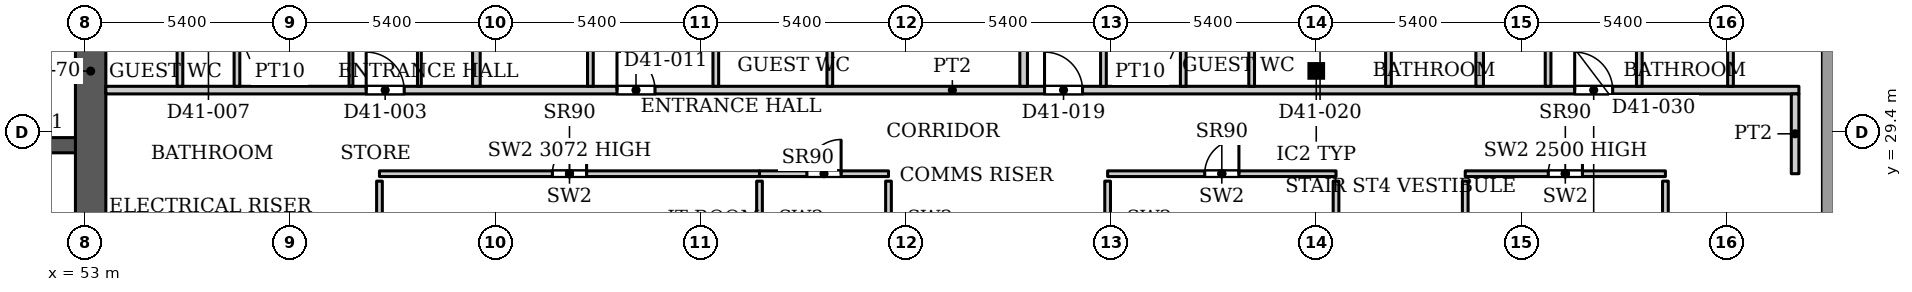
"""IFC4 building model, lengths in metres.
Left out: names, types, materials, properties, quantities, classifications, styles, units other than length and angle.
Written with IfcOpenShell. Run it as: python <this file> out.ifc"""

import sys

from ifc_helpers import new_model, si_unit, direction, frame, frame_2d, origin, origin_2d, place, context, subcontext, project, spatial, rectangle, hollow_rectangle, extrude, source, transform, mapped, element, fill, save


model = new_model("IFC4")
c1 = context("Model", 3, precision=1e-05, world=origin(), true_north=direction((0.0, 1.0)))
c2 = subcontext(c1, "Body", "Model", "MODEL_VIEW")
j1 = project(units=[si_unit("LENGTHUNIT", "METRE"), si_unit("PLANEANGLEUNIT", "RADIAN")], contexts=[c1])
p1 = place(None, origin())
s1 = spatial("IfcSite", under=j1, at=p1, CompositionType="ELEMENT")
p2 = place(p1, origin())
s2 = spatial("IfcBuilding", under=s1, at=p2, CompositionType="ELEMENT")
p3 = place(p2, frame((0.0, 0.0, 179.9)))
s3 = spatial("IfcBuildingStorey", under=s2, at=p3, CompositionType="ELEMENT", Elevation=179.9)
p4 = place(p3, frame((85.4, 31.005, 0.0), z_axis=(0.0, 0.0, 1.0), x_axis=(1.0, 0.0, 0.0)))
e1 = element("IfcColumn", 1, at=p4, inside=s3, PredefinedType="COLUMN", context=c2, shape_type="SweptSolid", body=[
    extrude(hollow_rectangle(XDim=0.305, YDim=0.305, WallThickness=0.016, InnerFilletRadius=0.016, OuterFilletRadius=0.032, at=origin_2d()), origin(), (0.0, 0.0, 1.0), 3.9),
])
p5 = place(p3, frame((34.75, 29.05, 0.0), z_axis=(0.0, 0.0, 1.0), x_axis=(1.0, 0.0, 0.0)))
e2 = element("IfcWall", 2, at=p5, inside=s3, PredefinedType="SHEAR", context=c2, shape_type="SweptSolid", body=[
    extrude(rectangle(XDim=18.4, YDim=0.4, at=frame_2d((9.2, 0.0))), origin(), (0.0, 0.0, 1.0), 3.9),
])
p6 = place(p5, frame((0.875, 0.0, 0.0)))
e3 = element("IfcOpeningElement", 3, at=p6, cuts=e2, PredefinedType="OPENING", context=c2, shape_type="SweptSolid", body=[
    extrude(rectangle(XDim=1.1, YDim=2.2, at=frame_2d((0.55, 1.1))), frame((0.0, 0.21, 0.0), z_axis=(0.0, -1.0, 0.0), x_axis=(1.0, 0.0, 0.0)), (0.0, 0.0, 1.0), 0.42),
])
p7 = place(p5, frame((3.725, 0.0, 0.0)))
e4 = element("IfcOpeningElement", 4, at=p7, cuts=e2, PredefinedType="OPENING", context=c2, shape_type="SweptSolid", body=[
    extrude(rectangle(XDim=1.1, YDim=2.2, at=frame_2d((0.55, 1.1))), frame((0.0, 0.21, 0.0), z_axis=(0.0, -1.0, 0.0), x_axis=(1.0, 0.0, 0.0)), (0.0, 0.0, 1.0), 0.42),
])
p8 = place(p5, frame((6.575, 0.0, 0.0)))
e5 = element("IfcOpeningElement", 5, at=p8, cuts=e2, PredefinedType="OPENING", context=c2, shape_type="SweptSolid", body=[
    extrude(rectangle(XDim=1.1, YDim=2.2, at=frame_2d((0.55, 1.1))), frame((0.0, 0.21, 0.0), z_axis=(0.0, -1.0, 0.0), x_axis=(1.0, 0.0, 0.0)), (0.0, 0.0, 1.0), 0.42),
])
p9 = place(p5, frame((9.425, 0.0, 0.0)))
e6 = element("IfcOpeningElement", 6, at=p9, cuts=e2, PredefinedType="OPENING", context=c2, shape_type="SweptSolid", body=[
    extrude(rectangle(XDim=1.1, YDim=2.2, at=frame_2d((0.55, 1.1))), frame((0.0, 0.21, 0.0), z_axis=(0.0, -1.0, 0.0), x_axis=(1.0, 0.0, 0.0)), (0.0, 0.0, 1.0), 0.42),
])
p10 = place(p5, frame((12.275, 0.0, 0.0)))
e7 = element("IfcOpeningElement", 7, at=p10, cuts=e2, PredefinedType="OPENING", context=c2, shape_type="SweptSolid", body=[
    extrude(rectangle(XDim=1.1, YDim=2.2, at=frame_2d((0.55, 1.1))), frame((0.0, 0.21, 0.0), z_axis=(0.0, -1.0, 0.0), x_axis=(1.0, 0.0, 0.0)), (0.0, 0.0, 1.0), 0.42),
])
p11 = place(p5, frame((15.125, 0.0, 0.0)))
e8 = element("IfcOpeningElement", 8, at=p11, cuts=e2, PredefinedType="OPENING", context=c2, shape_type="SweptSolid", body=[
    extrude(rectangle(XDim=1.1, YDim=2.2, at=frame_2d((0.55, 1.1))), frame((0.0, 0.21, 0.0), z_axis=(0.0, -1.0, 0.0), x_axis=(1.0, 0.0, 0.0)), (0.0, 0.0, 1.0), 0.42),
])
p12 = place(p3, frame((53.15, 25.8, 0.0), z_axis=(0.0, 0.0, 1.0), x_axis=(0.0, 1.0, 0.0)))
e9 = element("IfcWall", 9, at=p12, inside=s3, PredefinedType="SHEAR", context=c2, shape_type="SweptSolid", body=[
    extrude(rectangle(XDim=10.4, YDim=0.8, at=frame_2d((5.2, 0.0))), origin(), (0.0, 0.0, 1.0), 3.9),
])
p13 = place(p3, frame((60.75, 28.3, 0.0), z_axis=(0.0, 0.0, 1.0), x_axis=(1.0, 0.0, 0.0)))
e10 = element("IfcWall", 10, at=p13, inside=s3, PredefinedType="PARTITIONING", context=c2, shape_type="SweptSolid", body=[
    extrude(rectangle(XDim=10.0, YDim=0.15, at=frame_2d((5.0, 0.0))), origin(), (0.0, 0.0, 1.0), 3.072),
])
p14 = place(p13, frame((4.55, 0.0, 0.0)))
e11 = element("IfcOpeningElement", 11, at=p14, cuts=e10, PredefinedType="OPENING", context=c2, shape_type="SweptSolid", body=[
    extrude(rectangle(XDim=0.9, YDim=2.2, at=frame_2d((0.45, 1.1))), frame((0.0, 0.085, 0.0), z_axis=(0.0, -1.0, 0.0), x_axis=(1.0, 0.0, 0.0)), (0.0, 0.0, 1.0), 0.17),
])
p15 = place(p3, frame((60.75, 23.075, 0.0), z_axis=(0.0, 0.0, 1.0), x_axis=(0.0, 1.0, 0.0)))
e12 = element("IfcWall", 12, at=p15, inside=s3, PredefinedType="PARTITIONING", context=c2, shape_type="SweptSolid", body=[
    extrude(rectangle(XDim=5.03, YDim=0.15, at=frame_2d((2.515, 0.0))), origin(), (0.0, 0.0, 1.0), 3.9),
])
p16 = place(p3, frame((70.75, 26.12, 0.0), z_axis=(0.0, 0.0, 1.0), x_axis=(0.0, 1.0, 0.0)))
e13 = element("IfcWall", 13, at=p16, inside=s3, PredefinedType="PARTITIONING", context=c2, shape_type="SweptSolid", body=[
    extrude(rectangle(XDim=1.985, YDim=0.15, at=frame_2d((0.992, 0.0))), origin(), (0.0, 0.0, 1.0), 3.9),
])
p17 = place(p3, frame((70.75, 28.3, 0.0), z_axis=(0.0, 0.0, 1.0), x_axis=(1.0, 0.0, 0.0)))
e14 = element("IfcWall", 14, at=p17, inside=s3, PredefinedType="PARTITIONING", context=c2, shape_type="SweptSolid", body=[
    extrude(rectangle(XDim=3.394, YDim=0.15, at=frame_2d((1.697, 0.0))), origin(), (0.0, 0.0, 1.0), 3.9),
])
p18 = place(p17, frame((1.247, 0.0, 0.0)))
e15 = element("IfcOpeningElement", 15, at=p18, cuts=e14, PredefinedType="OPENING", context=c2, shape_type="SweptSolid", body=[
    extrude(rectangle(XDim=0.9, YDim=2.2, at=frame_2d((0.45, 1.1))), frame((0.0, 0.085, 0.0), z_axis=(0.0, -1.0, 0.0), x_axis=(1.0, 0.0, 0.0)), (0.0, 0.0, 1.0), 0.17),
])
p19 = place(p3, frame((74.144, 26.12, 0.0), z_axis=(0.0, 0.0, 1.0), x_axis=(0.0, 1.0, 0.0)))
e16 = element("IfcWall", 16, at=p19, inside=s3, PredefinedType="PARTITIONING", context=c2, shape_type="SweptSolid", body=[
    extrude(rectangle(XDim=1.985, YDim=0.15, at=frame_2d((0.992, 0.0))), origin(), (0.0, 0.0, 1.0), 3.9),
])
p20 = place(p3, frame((79.91, 28.3, 0.0), z_axis=(0.0, 0.0, 1.0), x_axis=(1.0, 0.0, 0.0)))
e17 = element("IfcWall", 17, at=p20, inside=s3, PredefinedType="PARTITIONING", context=c2, shape_type="SweptSolid", body=[
    extrude(rectangle(XDim=6.01, YDim=0.15, at=frame_2d((3.005, 0.0))), origin(), (0.0, 0.0, 1.0), 3.9),
])
p21 = place(p20, frame((2.555, 0.0, 0.0)))
e18 = element("IfcOpeningElement", 18, at=p21, cuts=e17, PredefinedType="OPENING", context=c2, shape_type="SweptSolid", body=[
    extrude(rectangle(XDim=0.9, YDim=2.2, at=frame_2d((0.45, 1.1))), frame((0.0, 0.085, 0.0), z_axis=(0.0, -1.0, 0.0), x_axis=(1.0, 0.0, 0.0)), (0.0, 0.0, 1.0), 0.17),
])
p22 = place(p3, frame((79.91, 26.12, 0.0), z_axis=(0.0, 0.0, 1.0), x_axis=(0.0, 1.0, 0.0)))
e19 = element("IfcWall", 19, at=p22, inside=s3, PredefinedType="PARTITIONING", context=c2, shape_type="SweptSolid", body=[
    extrude(rectangle(XDim=1.985, YDim=0.15, at=frame_2d((0.992, 0.0))), origin(), (0.0, 0.0, 1.0), 3.9),
])
p23 = place(p3, frame((85.92, 25.62, 0.0), z_axis=(0.0, 0.0, 1.0), x_axis=(0.0, 1.0, 0.0)))
e20 = element("IfcWall", 20, at=p23, inside=s3, PredefinedType="PARTITIONING", context=c2, shape_type="SweptSolid", body=[
    extrude(rectangle(XDim=2.485, YDim=0.15, at=frame_2d((1.242, 0.0))), origin(), (0.0, 0.0, 1.0), 3.9),
])
p24 = place(p3, frame((89.32, 28.3, 0.0), z_axis=(0.0, 0.0, 1.0), x_axis=(1.0, 0.0, 0.0)))
e21 = element("IfcWall", 21, at=p24, inside=s3, PredefinedType="PARTITIONING", context=c2, shape_type="SweptSolid", body=[
    extrude(rectangle(XDim=5.267, YDim=0.15, at=frame_2d((2.633, 0.0))), origin(), (0.0, 0.0, 1.0), 2.5),
])
p25 = place(p24, frame((2.184, 0.0, 0.0)))
e22 = element("IfcOpeningElement", 22, at=p25, cuts=e21, PredefinedType="OPENING", context=c2, shape_type="SweptSolid", body=[
    extrude(rectangle(XDim=0.9, YDim=2.2, at=frame_2d((0.45, 1.1))), frame((0.0, 0.085, 0.0), z_axis=(0.0, -1.0, 0.0), x_axis=(1.0, 0.0, 0.0)), (0.0, 0.0, 1.0), 0.17),
])
p26 = place(p3, frame((89.32, 25.62, 0.0), z_axis=(0.0, 0.0, 1.0), x_axis=(0.0, 1.0, 0.0)))
e23 = element("IfcWall", 23, at=p26, inside=s3, PredefinedType="PARTITIONING", context=c2, shape_type="SweptSolid", body=[
    extrude(rectangle(XDim=2.485, YDim=0.15, at=frame_2d((1.242, 0.0))), origin(), (0.0, 0.0, 1.0), 3.9),
])
p27 = place(p3, frame((94.587, 21.293, 0.0), z_axis=(0.0, 0.0, 1.0), x_axis=(0.0, 1.0, 0.0)))
e24 = element("IfcWall", 24, at=p27, inside=s3, PredefinedType="PARTITIONING", context=c2, shape_type="SweptSolid", body=[
    extrude(rectangle(XDim=6.812, YDim=0.15, at=frame_2d((3.406, 0.0))), origin(), (0.0, 0.0, 1.0), 3.9),
])
p28 = place(p3, frame((53.549, 30.5, 0.0), z_axis=(0.0, 0.0, 1.0), x_axis=(1.0, 0.0, 0.0)))
e25 = element("IfcWall", 25, at=p28, inside=s3, PredefinedType="PARTITIONING", context=c2, shape_type="SweptSolid", body=[
    extrude(rectangle(XDim=44.551, YDim=0.2, at=frame_2d((22.275, 0.0))), origin(), (0.0, 0.0, 1.0), 3.6),
])
p29 = place(p28, frame((6.851, 0.0, 0.0)))
e26 = element("IfcOpeningElement", 26, at=p29, cuts=e25, PredefinedType="OPENING", context=c2, shape_type="SweptSolid", body=[
    extrude(rectangle(XDim=1.0, YDim=2.1, at=frame_2d((0.5, 1.05))), frame((0.0, 0.11, 0.0), z_axis=(0.0, -1.0, 0.0), x_axis=(1.0, 0.0, 0.0)), (0.0, 0.0, 1.0), 0.22),
])
p30 = place(p28, frame((13.451, 0.0, 0.0)))
e27 = element("IfcOpeningElement", 27, at=p30, cuts=e25, PredefinedType="OPENING", context=c2, shape_type="SweptSolid", body=[
    extrude(rectangle(XDim=1.0, YDim=2.1, at=frame_2d((0.5, 1.05))), frame((0.0, 0.11, 0.0), z_axis=(0.0, -1.0, 0.0), x_axis=(1.0, 0.0, 0.0)), (0.0, 0.0, 1.0), 0.22),
])
p31 = place(p28, frame((24.701, 0.0, 0.0)))
e28 = element("IfcOpeningElement", 28, at=p31, cuts=e25, PredefinedType="OPENING", context=c2, shape_type="SweptSolid", body=[
    extrude(rectangle(XDim=1.0, YDim=2.1, at=frame_2d((0.5, 1.05))), frame((0.0, 0.11, 0.0), z_axis=(0.0, -1.0, 0.0), x_axis=(1.0, 0.0, 0.0)), (0.0, 0.0, 1.0), 0.22),
])
p32 = place(p28, frame((38.651, 0.0, 0.0)))
e29 = element("IfcOpeningElement", 29, at=p32, cuts=e25, PredefinedType="OPENING", context=c2, shape_type="SweptSolid", body=[
    extrude(rectangle(XDim=1.0, YDim=2.1, at=frame_2d((0.5, 1.05))), frame((0.0, 0.11, 0.0), z_axis=(0.0, -1.0, 0.0), x_axis=(1.0, 0.0, 0.0)), (0.0, 0.0, 1.0), 0.22),
])
for number, where, z_axis, x_axis in (
    (30, (55.5, 30.6, 0.0), (0.0, 0.0, 1.0), (0.0, 1.0, 0.0)),
    (31, (57.0, 30.6, 0.0), (0.0, 0.0, 1.0), (0.0, 1.0, 0.0)),
):
    element("IfcWall", number, at=place(p3, frame(where, z_axis=z_axis, x_axis=x_axis)), inside=s3, PredefinedType="PARTITIONING", context=c2, shape_type="SweptSolid", body=[
        extrude(rectangle(XDim=3.025, YDim=0.15, at=frame_2d((1.512, 0.0))), origin(), (0.0, 0.0, 1.0), 3.6),
    ])
for number, where, z_axis, x_axis in (
    (32, (60.0, 30.6, 0.0), (0.0, 0.0, 1.0), (0.0, 1.0, 0.0)),
    (33, (61.8, 30.6, 0.0), (0.0, 0.0, 1.0), (0.0, 1.0, 0.0)),
):
    element("IfcWall", number, at=place(p3, frame(where, z_axis=z_axis, x_axis=x_axis)), inside=s3, PredefinedType="PARTITIONING", context=c2, shape_type="SweptSolid", body=[
        extrude(rectangle(XDim=3.025, YDim=0.1, at=frame_2d((1.512, 0.0))), origin(), (0.0, 0.0, 1.0), 3.6),
    ])
p33 = place(p3, frame((63.3, 30.6, 0.0), z_axis=(0.0, 0.0, 1.0), x_axis=(0.0, 1.0, 0.0)))
e34 = element("IfcWall", 34, at=p33, inside=s3, PredefinedType="PARTITIONING", context=c2, shape_type="SweptSolid", body=[
    extrude(rectangle(XDim=13.3, YDim=0.2, at=frame_2d((6.65, 0.0))), origin(), (0.0, 0.0, 1.0), 3.6),
])
p34 = place(p3, frame((66.3, 30.6, 0.0), z_axis=(0.0, 0.0, 1.0), x_axis=(0.0, 1.0, 0.0)))
e35 = element("IfcWall", 35, at=p34, inside=s3, PredefinedType="PARTITIONING", context=c2, shape_type="SweptSolid", body=[
    extrude(rectangle(XDim=3.175, YDim=0.15, at=frame_2d((1.587, 0.0))), origin(), (0.0, 0.0, 1.0), 3.6),
])
for number, where, z_axis, x_axis in (
    (36, (69.6, 30.6, 0.0), (0.0, 0.0, 1.0), (0.0, 1.0, 0.0)),
    (37, (72.6, 30.6, 0.0), (0.0, 0.0, 1.0), (0.0, 1.0, 0.0)),
):
    element("IfcWall", number, at=place(p3, frame(where, z_axis=z_axis, x_axis=x_axis)), inside=s3, PredefinedType="PARTITIONING", context=c2, shape_type="SweptSolid", body=[
        extrude(rectangle(XDim=3.025, YDim=0.15, at=frame_2d((1.512, 0.0))), origin(), (0.0, 0.0, 1.0), 3.6),
    ])
p35 = place(p3, frame((77.7, 30.6, 0.0), z_axis=(0.0, 0.0, 1.0), x_axis=(0.0, 1.0, 0.0)))
e38 = element("IfcWall", 38, at=p35, inside=s3, PredefinedType="PARTITIONING", context=c2, shape_type="SweptSolid", body=[
    extrude(rectangle(XDim=13.3, YDim=0.2, at=frame_2d((6.65, 0.0))), origin(), (0.0, 0.0, 1.0), 3.6),
])
for number, where, z_axis, x_axis in (
    (39, (79.8, 30.6, 0.0), (0.0, 0.0, 1.0), (0.0, 1.0, 0.0)),
    (40, (81.9, 30.6, 0.0), (0.0, 0.0, 1.0), (0.0, 1.0, 0.0)),
    (41, (83.7, 30.6, 0.0), (0.0, 0.0, 1.0), (0.0, 1.0, 0.0)),
    (42, (87.3, 30.6, 0.0), (0.0, 0.0, 1.0), (0.0, 1.0, 0.0)),
):
    element("IfcWall", number, at=place(p3, frame(where, z_axis=z_axis, x_axis=x_axis)), inside=s3, PredefinedType="PARTITIONING", context=c2, shape_type="SweptSolid", body=[
        extrude(rectangle(XDim=3.025, YDim=0.15, at=frame_2d((1.512, 0.0))), origin(), (0.0, 0.0, 1.0), 3.6),
    ])
p36 = place(p3, frame((89.7, 30.6, 0.0), z_axis=(0.0, 0.0, 1.0), x_axis=(0.0, 1.0, 0.0)))
e43 = element("IfcWall", 43, at=p36, inside=s3, PredefinedType="PARTITIONING", context=c2, shape_type="SweptSolid", body=[
    extrude(rectangle(XDim=13.3, YDim=0.2, at=frame_2d((6.65, 0.0))), origin(), (0.0, 0.0, 1.0), 3.6),
])
p37 = place(p3, frame((91.5, 30.6, 0.0), z_axis=(0.0, 0.0, 1.0), x_axis=(0.0, 1.0, 0.0)))
e44 = element("IfcWall", 44, at=p37, inside=s3, PredefinedType="PARTITIONING", context=c2, shape_type="SweptSolid", body=[
    extrude(rectangle(XDim=3.175, YDim=0.15, at=frame_2d((1.587, 0.0))), origin(), (0.0, 0.0, 1.0), 3.6),
])
for number, where, z_axis, x_axis in (
    (45, (93.9, 30.6, 0.0), (0.0, 0.0, 1.0), (0.0, 1.0, 0.0)),
    (46, (96.3, 30.6, 0.0), (0.0, 0.0, 1.0), (0.0, 1.0, 0.0)),
):
    element("IfcWall", number, at=place(p3, frame(where, z_axis=z_axis, x_axis=x_axis)), inside=s3, PredefinedType="PARTITIONING", context=c2, shape_type="SweptSolid", body=[
        extrude(rectangle(XDim=3.025, YDim=0.15, at=frame_2d((1.512, 0.0))), origin(), (0.0, 0.0, 1.0), 3.6),
    ])
p38 = place(p3, frame((98.0, 28.3, 0.0), z_axis=(0.0, 0.0, 1.0), x_axis=(0.0, 1.0, 0.0)))
e47 = element("IfcWall", 47, at=p38, inside=s3, PredefinedType="PARTITIONING", context=c2, shape_type="SweptSolid", body=[
    extrude(rectangle(XDim=2.1, YDim=0.2, at=frame_2d((1.05, 0.0))), origin(), (0.0, 0.0, 1.0), 3.6),
])
m1 = source(origin(), c2, "Body", "SweptSolid", [
    extrude(rectangle(XDim=0.9, YDim=2.2, at=frame_2d((0.45, 1.1))), frame((0.0, 0.025, 0.0), z_axis=(0.0, -1.0, 0.0), x_axis=(1.0, 0.0, 0.0)), (0.0, 0.0, 1.0), 0.05),
])
p39 = place(p14, origin())
e48 = element("IfcDoor", 48, at=p39, inside=s3, OperationType="SINGLE_SWING_LEFT", PredefinedType="DOOR", context=c2, shape_type="MappedRepresentation", body=[
    mapped(m1, transform((0.0, 0.0, 0.0), x_axis=(1.0, 0.0, 0.0), y_axis=(0.0, 1.0, 0.0), z_axis=(0.0, 0.0, 1.0), scale=1.0)),
])
fill(e11, e48)
p40 = place(p18, origin())
e49 = element("IfcDoor", 49, at=p40, inside=s3, OperationType="SINGLE_SWING_LEFT", PredefinedType="DOOR", context=c2, shape_type="MappedRepresentation", body=[
    mapped(m1, transform((0.0, 0.0, 0.0), x_axis=(1.0, 0.0, 0.0), y_axis=(0.0, 1.0, 0.0), z_axis=(0.0, 0.0, 1.0), scale=1.0)),
])
fill(e15, e49)
p41 = place(p21, origin())
e50 = element("IfcDoor", 50, at=p41, inside=s3, OperationType="SINGLE_SWING_LEFT", PredefinedType="DOOR", context=c2, shape_type="MappedRepresentation", body=[
    mapped(m1, transform((0.0, 0.0, 0.0), x_axis=(1.0, 0.0, 0.0), y_axis=(0.0, 1.0, 0.0), z_axis=(0.0, 0.0, 1.0), scale=1.0)),
])
fill(e18, e50)
p42 = place(p25, origin())
e51 = element("IfcDoor", 51, at=p42, inside=s3, OperationType="SINGLE_SWING_LEFT", PredefinedType="DOOR", context=c2, shape_type="MappedRepresentation", body=[
    mapped(m1, transform((0.0, 0.0, 0.0), x_axis=(1.0, 0.0, 0.0), y_axis=(0.0, 1.0, 0.0), z_axis=(0.0, 0.0, 1.0), scale=1.0)),
])
fill(e22, e51)
m2 = source(origin(), c2, "Body", "SweptSolid", [
    extrude(rectangle(XDim=1.0, YDim=2.1, at=frame_2d((0.5, 1.05))), frame((0.0, 0.025, 0.0), z_axis=(0.0, -1.0, 0.0), x_axis=(1.0, 0.0, 0.0)), (0.0, 0.0, 1.0), 0.05),
])
p43 = place(p29, origin())
e52 = element("IfcDoor", 52, at=p43, inside=s3, OperationType="SINGLE_SWING_LEFT", PredefinedType="DOOR", context=c2, shape_type="MappedRepresentation", body=[
    mapped(m2, transform((0.0, 0.0, 0.0), x_axis=(1.0, 0.0, 0.0), y_axis=(0.0, 1.0, 0.0), z_axis=(0.0, 0.0, 1.0), scale=1.0)),
])
fill(e26, e52)
p44 = place(p30, origin())
e53 = element("IfcDoor", 53, at=p44, inside=s3, OperationType="SINGLE_SWING_LEFT", PredefinedType="DOOR", context=c2, shape_type="MappedRepresentation", body=[
    mapped(m2, transform((0.0, 0.0, 0.0), x_axis=(1.0, 0.0, 0.0), y_axis=(0.0, 1.0, 0.0), z_axis=(0.0, 0.0, 1.0), scale=1.0)),
])
fill(e27, e53)
p45 = place(p31, origin())
e54 = element("IfcDoor", 54, at=p45, inside=s3, OperationType="SINGLE_SWING_LEFT", PredefinedType="DOOR", context=c2, shape_type="MappedRepresentation", body=[
    mapped(m2, transform((0.0, 0.0, 0.0), x_axis=(1.0, 0.0, 0.0), y_axis=(0.0, 1.0, 0.0), z_axis=(0.0, 0.0, 1.0), scale=1.0)),
])
fill(e28, e54)
p46 = place(p32, origin())
e55 = element("IfcDoor", 55, at=p46, inside=s3, OperationType="SINGLE_SWING_LEFT", PredefinedType="DOOR", context=c2, shape_type="MappedRepresentation", body=[
    mapped(m2, transform((0.0, 0.0, 0.0), x_axis=(1.0, 0.0, 0.0), y_axis=(0.0, 1.0, 0.0), z_axis=(0.0, 0.0, 1.0), scale=1.0)),
])
fill(e29, e55)
save(model, sys.argv[1])
